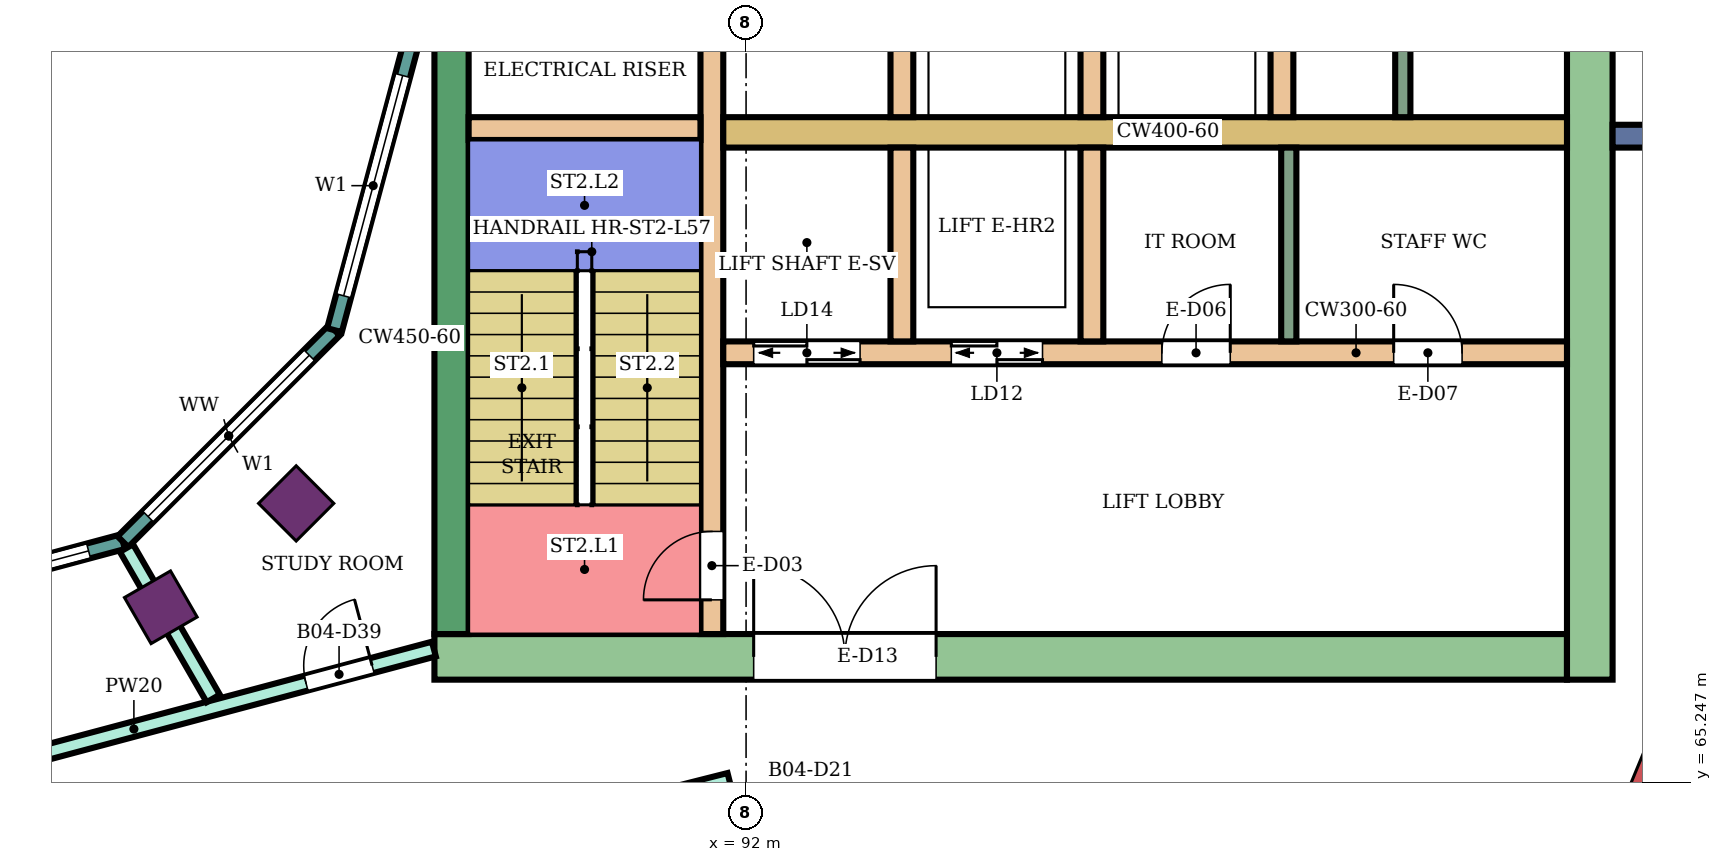
"""IFC4 building model, lengths in metres.
Left out: names, types, materials, properties, quantities, classifications, styles, units other than length and angle.
Written with IfcOpenShell. Run it as: python <this file> out.ifc"""

import sys

from ifc_helpers import new_model, si_unit, direction, frame, frame_2d, origin, origin_2d, place, context, subcontext, project, spatial, rectangle, extrude, element, fill, save


model = new_model("IFC4")
c1 = context("Model", 3, precision=1e-05, world=origin(), true_north=direction((0.0, 1.0)))
c2 = subcontext(c1, "Body", "Model", "MODEL_VIEW")
j1 = project(units=[si_unit("LENGTHUNIT", "METRE"), si_unit("PLANEANGLEUNIT", "RADIAN")], contexts=[c1])
p1 = place(None, origin())
s1 = spatial("IfcSite", under=j1, at=p1, CompositionType="ELEMENT")
p2 = place(p1, origin())
s2 = spatial("IfcBuilding", under=s1, at=p2, CompositionType="ELEMENT")
p3 = place(p2, frame((0.0, 0.0, 249.9)))
s3 = spatial("IfcBuildingStorey", under=s2, at=p3, CompositionType="ELEMENT", Elevation=249.9)
for number, where, z_axis, x_axis in (
    (1, (84.3, 67.552, 0.0), (0.0, 0.0, 1.0), (0.5, -0.866, 0.0)),
    (2, (86.081, 68.919, 0.0), (0.0, 0.0, 1.0), (0.707, -0.707, 0.0)),
):
    element("IfcColumn", number, at=place(p3, frame(where, z_axis=z_axis, x_axis=x_axis)), inside=s3, PredefinedType="COLUMN", context=c2, shape_type="SweptSolid", body=[
        extrude(rectangle(XDim=0.7, YDim=0.7, at=origin_2d()), origin(), (0.0, 0.0, 1.0), 4.2),
    ])
p4 = place(p3, frame((87.9, 66.9, 0.0), z_axis=(0.0, 0.0, 1.0), x_axis=(1.0, 0.0, 0.0)))
e3 = element("IfcWall", 3, at=p4, inside=s3, PredefinedType="SHEAR", context=c2, shape_type="SweptSolid", body=[
    extrude(rectangle(XDim=14.9, YDim=0.6, at=frame_2d((7.45, 0.0))), origin(), (0.0, 0.0, 1.0), 3.88),
])
p5 = place(p4, frame((4.2, 0.0, 0.0)))
e4 = element("IfcOpeningElement", 4, at=p5, cuts=e3, PredefinedType="OPENING", context=c2, shape_type="SweptSolid", body=[
    extrude(rectangle(XDim=2.4, YDim=2.4, at=frame_2d((1.2, 1.2))), frame((0.0, 0.31, 0.0), z_axis=(0.0, -1.0, 0.0), x_axis=(1.0, 0.0, 0.0)), (0.0, 0.0, 1.0), 0.62),
])
p6 = place(p3, frame((88.125, 67.2, 0.0), z_axis=(0.0, 0.0, 1.0), x_axis=(0.0, 1.0, 0.0)))
e5 = element("IfcWall", 5, at=p6, inside=s3, PredefinedType="SHEAR", context=c2, shape_type="SweptSolid", body=[
    extrude(rectangle(XDim=7.8, YDim=0.45, at=frame_2d((3.9, 0.0))), origin(), (0.0, 0.0, 1.0), 3.88),
])
p7 = place(p3, frame((103.1, 66.6, 0.0), z_axis=(0.0, 0.0, 1.0), x_axis=(0.0, 1.0, 0.0)))
e6 = element("IfcWall", 6, at=p7, inside=s3, PredefinedType="SHEAR", context=c2, shape_type="SweptSolid", body=[
    extrude(rectangle(XDim=16.8, YDim=0.6, at=frame_2d((8.4, 0.0))), origin(), (0.0, 0.0, 1.0), 3.88),
])
p8 = place(p3, frame((91.55, 67.2, 0.0), z_axis=(0.0, 0.0, 1.0), x_axis=(0.0, 1.0, 0.0)))
e7 = element("IfcWall", 7, at=p8, inside=s3, PredefinedType="SHEAR", context=c2, shape_type="SweptSolid", body=[
    extrude(rectangle(XDim=7.8, YDim=0.3, at=frame_2d((3.9, 0.0))), origin(), (0.0, 0.0, 1.0), 3.88),
])
p9 = place(p8, frame((0.45, 0.0, 0.0)))
e8 = element("IfcOpeningElement", 8, at=p9, cuts=e7, PredefinedType="OPENING", context=c2, shape_type="SweptSolid", body=[
    extrude(rectangle(XDim=0.9, YDim=2.1, at=frame_2d((0.45, 1.05))), frame((0.0, 0.16, 0.0), z_axis=(0.0, -1.0, 0.0), x_axis=(1.0, 0.0, 0.0)), (0.0, 0.0, 1.0), 0.32),
])
p10 = place(p3, frame((88.35, 73.85, 0.0), z_axis=(0.0, 0.0, 1.0), x_axis=(1.0, 0.0, 0.0)))
e9 = element("IfcWall", 9, at=p10, inside=s3, PredefinedType="SHEAR", context=c2, shape_type="SweptSolid", body=[
    extrude(rectangle(XDim=3.05, YDim=0.3, at=frame_2d((1.525, 0.0))), origin(), (0.0, 0.0, 1.0), 3.88),
])
p11 = place(p3, frame((91.7, 73.8, 0.0), z_axis=(0.0, 0.0, 1.0), x_axis=(1.0, 0.0, 0.0)))
e10 = element("IfcWall", 10, at=p11, inside=s3, PredefinedType="SHEAR", context=c2, shape_type="SweptSolid", body=[
    extrude(rectangle(XDim=11.1, YDim=0.4, at=frame_2d((5.55, 0.0))), origin(), (0.0, 0.0, 1.0), 3.88),
])
p12 = place(p3, frame((91.7, 70.9, 0.0), z_axis=(0.0, 0.0, 1.0), x_axis=(1.0, 0.0, 0.0)))
e11 = element("IfcWall", 11, at=p12, inside=s3, PredefinedType="SHEAR", context=c2, shape_type="SweptSolid", body=[
    extrude(rectangle(XDim=11.1, YDim=0.3, at=frame_2d((5.55, 0.0))), origin(), (0.0, 0.0, 1.0), 3.88),
])
p13 = place(p12, frame((0.4, 0.0, 0.0)))
e12 = element("IfcOpeningElement", 12, at=p13, cuts=e11, PredefinedType="OPENING", context=c2, shape_type="SweptSolid", body=[
    extrude(rectangle(XDim=1.4, YDim=2.1, at=frame_2d((0.7, 1.05))), frame((0.0, 0.16, 0.0), z_axis=(0.0, -1.0, 0.0), x_axis=(1.0, 0.0, 0.0)), (0.0, 0.0, 1.0), 0.32),
])
p14 = place(p12, frame((3.0, 0.0, 0.0)))
e13 = element("IfcOpeningElement", 13, at=p14, cuts=e11, PredefinedType="OPENING", context=c2, shape_type="SweptSolid", body=[
    extrude(rectangle(XDim=1.2, YDim=2.1, at=frame_2d((0.6, 1.05))), frame((0.0, 0.16, 0.0), z_axis=(0.0, -1.0, 0.0), x_axis=(1.0, 0.0, 0.0)), (0.0, 0.0, 1.0), 0.32),
])
p15 = place(p12, frame((5.77, 0.0, 0.0)))
e14 = element("IfcOpeningElement", 14, at=p15, cuts=e11, PredefinedType="OPENING", context=c2, shape_type="SweptSolid", body=[
    extrude(rectangle(XDim=0.9, YDim=2.1, at=frame_2d((0.45, 1.05))), frame((0.0, 0.16, 0.0), z_axis=(0.0, -1.0, 0.0), x_axis=(1.0, 0.0, 0.0)), (0.0, 0.0, 1.0), 0.32),
])
p16 = place(p12, frame((8.82, 0.0, 0.0)))
e15 = element("IfcOpeningElement", 15, at=p16, cuts=e11, PredefinedType="OPENING", context=c2, shape_type="SweptSolid", body=[
    extrude(rectangle(XDim=0.9, YDim=2.1, at=frame_2d((0.45, 1.05))), frame((0.0, 0.16, 0.0), z_axis=(0.0, -1.0, 0.0), x_axis=(1.0, 0.0, 0.0)), (0.0, 0.0, 1.0), 0.32),
])
for number, where, z_axis, x_axis in (
    (16, (94.05, 74.0, 0.0), (0.0, 0.0, 1.0), (0.0, 1.0, 0.0)),
    (17, (96.55, 74.0, 0.0), (0.0, 0.0, 1.0), (0.0, 1.0, 0.0)),
    (18, (99.05, 74.0, 0.0), (0.0, 0.0, 1.0), (0.0, 1.0, 0.0)),
    (19, (94.05, 71.05, 0.0), (0.0, 0.0, 1.0), (0.0, 1.0, 0.0)),
    (20, (96.55, 71.05, 0.0), (0.0, 0.0, 1.0), (0.0, 1.0, 0.0)),
):
    element("IfcWall", number, at=place(p3, frame(where, z_axis=z_axis, x_axis=x_axis)), inside=s3, PredefinedType="SHEAR", context=c2, shape_type="SweptSolid", body=[
        extrude(rectangle(XDim=2.55, YDim=0.3, at=frame_2d((1.275, 0.0))), origin(), (0.0, 0.0, 1.0), 3.88),
    ])
p17 = place(p3, frame((103.4, 73.75, 0.0), z_axis=(0.0, 0.0, 1.0), x_axis=(1.0, 0.0, 0.0)))
e21 = element("IfcWall", 21, at=p17, inside=s3, PredefinedType="NOTDEFINED", context=c2, shape_type="SweptSolid", body=[
    extrude(rectangle(XDim=2.416, YDim=0.3, at=frame_2d((1.208, 0.0))), origin(), (0.0, 0.0, 1.0), 4.2),
])
p18 = place(p3, frame((80.0, 67.396, 0.0), z_axis=(0.0, 0.0, 1.0), x_axis=(0.965933654434, 0.258789828301, 0.0)))
e22 = element("IfcWall", 22, at=p18, inside=s3, PredefinedType="NOTDEFINED", context=c2, shape_type="SweptSolid", body=[
    extrude(rectangle(XDim=3.936, YDim=0.2, at=frame_2d((1.968, 0.0))), origin(), (0.0, 0.0, 1.0), 4.2),
])
p19 = place(p18, frame((0.468, 0.0, 0.9)))
e23 = element("IfcOpeningElement", 23, at=p19, cuts=e22, PredefinedType="OPENING", context=c2, shape_type="SweptSolid", body=[
    extrude(rectangle(XDim=3.0, YDim=2.3, at=frame_2d((1.5, 1.15))), frame((0.0, 0.11, 0.0), z_axis=(0.0, -1.0, 0.0), x_axis=(1.0, 0.0, 0.0)), (0.0, 0.0, 1.0), 0.22),
])
p20 = place(p3, frame((83.802, 68.415, 0.0), z_axis=(0.0, 0.0, 1.0), x_axis=(0.707106781187, 0.707106781187, 0.0)))
e24 = element("IfcWall", 24, at=p20, inside=s3, PredefinedType="NOTDEFINED", context=c2, shape_type="SweptSolid", body=[
    extrude(rectangle(XDim=3.936, YDim=0.2, at=frame_2d((1.968, 0.0))), origin(), (0.0, 0.0, 1.0), 4.2),
])
p21 = place(p20, frame((0.468, 0.0, 0.9)))
e25 = element("IfcOpeningElement", 25, at=p21, cuts=e24, PredefinedType="OPENING", context=c2, shape_type="SweptSolid", body=[
    extrude(rectangle(XDim=3.0, YDim=2.3, at=frame_2d((1.5, 1.15))), frame((0.0, 0.11, 0.0), z_axis=(0.0, -1.0, 0.0), x_axis=(1.0, 0.0, 0.0)), (0.0, 0.0, 1.0), 0.22),
])
p22 = place(p3, frame((86.585, 71.198, 0.0), z_axis=(0.0, 0.0, 1.0), x_axis=(0.258789828301, 0.965933654434, 0.0)))
e26 = element("IfcWall", 26, at=p22, inside=s3, PredefinedType="NOTDEFINED", context=c2, shape_type="SweptSolid", body=[
    extrude(rectangle(XDim=3.936, YDim=0.2, at=frame_2d((1.968, 0.0))), origin(), (0.0, 0.0, 1.0), 4.2),
])
p23 = place(p22, frame((0.468, 0.0, 0.9)))
e27 = element("IfcOpeningElement", 27, at=p23, cuts=e26, PredefinedType="OPENING", context=c2, shape_type="SweptSolid", body=[
    extrude(rectangle(XDim=3.0, YDim=2.3, at=frame_2d((1.5, 1.15))), frame((0.0, 0.11, 0.0), z_axis=(0.0, -1.0, 0.0), x_axis=(1.0, 0.0, 0.0)), (0.0, 0.0, 1.0), 0.22),
])
p24 = place(p3, frame((80.0, 64.898, 0.0), z_axis=(0.0, 0.0, 1.0), x_axis=(0.966237419782, 0.257653349704, 0.0)))
e28 = element("IfcWall", 28, at=p24, inside=s3, PredefinedType="PARTITIONING", context=c2, shape_type="SweptSolid", body=[
    extrude(rectangle(XDim=8.169, YDim=0.2, at=frame_2d((4.084, 0.0))), origin(), (0.0, 0.0, 1.0), 3.75),
])
p25 = place(p24, frame((6.428, 0.0, 0.0)))
e29 = element("IfcOpeningElement", 29, at=p25, cuts=e28, PredefinedType="OPENING", context=c2, shape_type="SweptSolid", body=[
    extrude(rectangle(XDim=0.9, YDim=2.1, at=frame_2d((0.45, 1.05))), frame((0.0, 0.11, 0.0), z_axis=(0.0, -1.0, 0.0), x_axis=(1.0, 0.0, 0.0)), (0.0, 0.0, 1.0), 0.22),
])
p26 = place(p3, frame((83.848, 68.331, 0.0), z_axis=(0.0, 0.0, 1.0), x_axis=(0.499851978358, -0.866110847255, 0.0)))
e30 = element("IfcWall", 30, at=p26, inside=s3, PredefinedType="PARTITIONING", context=c2, shape_type="SweptSolid", body=[
    extrude(rectangle(XDim=2.284, YDim=0.2, at=frame_2d((1.142, 0.0))), origin(), (0.0, 0.0, 1.0), 3.75),
])
p27 = place(p3, frame((86.053, 63.826, 0.0), z_axis=(0.0, 0.0, 1.0), x_axis=(0.969490004987, 0.245130843083, 0.0)))
e31 = element("IfcWall", 31, at=p27, inside=s3, PredefinedType="PARTITIONING", context=c2, shape_type="SweptSolid", body=[
    extrude(rectangle(XDim=5.908, YDim=0.2, at=frame_2d((2.954, 0.0))), origin(), (0.0, 0.0, 1.0), 3.75),
])
for number, where, z_axis, x_axis in (
    (32, (100.64, 74.0, 0.0), (0.0, 0.0, 1.0), (0.0, 1.0, 0.0)),
    (33, (99.14, 71.05, 0.0), (0.0, 0.0, 1.0), (0.0, 1.0, 0.0)),
):
    element("IfcWall", number, at=place(p3, frame(where, z_axis=z_axis, x_axis=x_axis)), inside=s3, PredefinedType="PARTITIONING", context=c2, shape_type="SweptSolid", body=[
        extrude(rectangle(XDim=2.55, YDim=0.2, at=frame_2d((1.275, 0.0))), origin(), (0.0, 0.0, 1.0), 3.88),
    ])
p28 = place(p19, origin())
e34 = element("IfcWindow", 34, at=p28, inside=s3, PartitioningType="SINGLE_PANEL", PredefinedType="WINDOW", context=c2, shape_type="SweptSolid", body=[
    extrude(rectangle(XDim=3.0, YDim=2.3, at=frame_2d((1.5, 1.15))), frame((0.0, 0.03, 0.0), z_axis=(0.0, -1.0, 0.0), x_axis=(1.0, 0.0, 0.0)), (0.0, 0.0, 1.0), 0.06),
])
fill(e23, e34)
p29 = place(p21, origin())
e35 = element("IfcWindow", 35, at=p29, inside=s3, PartitioningType="SINGLE_PANEL", PredefinedType="WINDOW", context=c2, shape_type="SweptSolid", body=[
    extrude(rectangle(XDim=3.0, YDim=2.3, at=frame_2d((1.5, 1.15))), frame((0.0, 0.03, 0.0), z_axis=(0.0, -1.0, 0.0), x_axis=(1.0, 0.0, 0.0)), (0.0, 0.0, 1.0), 0.06),
])
fill(e25, e35)
p30 = place(p23, origin())
e36 = element("IfcWindow", 36, at=p30, inside=s3, PartitioningType="SINGLE_PANEL", PredefinedType="WINDOW", context=c2, shape_type="SweptSolid", body=[
    extrude(rectangle(XDim=3.0, YDim=2.3, at=frame_2d((1.5, 1.15))), frame((0.0, 0.03, 0.0), z_axis=(0.0, -1.0, 0.0), x_axis=(1.0, 0.0, 0.0)), (0.0, 0.0, 1.0), 0.06),
])
fill(e27, e36)
p31 = place(p25, origin())
e37 = element("IfcDoor", 37, at=p31, inside=s3, OperationType="SINGLE_SWING_RIGHT", PredefinedType="DOOR", context=c2, shape_type="SweptSolid", body=[
    extrude(rectangle(XDim=0.9, YDim=2.1, at=frame_2d((0.45, 1.05))), frame((0.0, 0.025, 0.0), z_axis=(0.0, -1.0, 0.0), x_axis=(1.0, 0.0, 0.0)), (0.0, 0.0, 1.0), 0.05),
])
fill(e29, e37)
p32 = place(p9, origin())
e38 = element("IfcDoor", 38, at=p32, inside=s3, OperationType="SINGLE_SWING_LEFT", PredefinedType="DOOR", context=c2, shape_type="SweptSolid", body=[
    extrude(rectangle(XDim=0.9, YDim=2.1, at=frame_2d((0.45, 1.05))), frame((0.0, 0.025, 0.0), z_axis=(0.0, -1.0, 0.0), x_axis=(1.0, 0.0, 0.0)), (0.0, 0.0, 1.0), 0.05),
])
fill(e8, e38)
p33 = place(p13, origin())
e39 = element("IfcDoor", 39, at=p33, inside=s3, OperationType="DOUBLE_DOOR_SLIDING", PredefinedType="DOOR", context=c2, shape_type="SweptSolid", body=[
    extrude(rectangle(XDim=1.4, YDim=2.1, at=frame_2d((0.7, 1.05))), frame((0.0, 0.025, 0.0), z_axis=(0.0, -1.0, 0.0), x_axis=(1.0, 0.0, 0.0)), (0.0, 0.0, 1.0), 0.05),
])
fill(e12, e39)
p34 = place(p14, origin())
e40 = element("IfcDoor", 40, at=p34, inside=s3, OperationType="DOUBLE_DOOR_SLIDING", PredefinedType="DOOR", context=c2, shape_type="SweptSolid", body=[
    extrude(rectangle(XDim=1.2, YDim=2.1, at=frame_2d((0.6, 1.05))), frame((0.0, 0.025, 0.0), z_axis=(0.0, -1.0, 0.0), x_axis=(1.0, 0.0, 0.0)), (0.0, 0.0, 1.0), 0.05),
])
fill(e13, e40)
p35 = place(p15, origin())
e41 = element("IfcDoor", 41, at=p35, inside=s3, OperationType="SINGLE_SWING_RIGHT", PredefinedType="DOOR", context=c2, shape_type="SweptSolid", body=[
    extrude(rectangle(XDim=0.9, YDim=2.1, at=frame_2d((0.45, 1.05))), frame((0.0, 0.025, 0.0), z_axis=(0.0, -1.0, 0.0), x_axis=(1.0, 0.0, 0.0)), (0.0, 0.0, 1.0), 0.05),
])
fill(e14, e41)
p36 = place(p16, origin())
e42 = element("IfcDoor", 42, at=p36, inside=s3, OperationType="SINGLE_SWING_LEFT", PredefinedType="DOOR", context=c2, shape_type="SweptSolid", body=[
    extrude(rectangle(XDim=0.9, YDim=2.1, at=frame_2d((0.45, 1.05))), frame((0.0, 0.025, 0.0), z_axis=(0.0, -1.0, 0.0), x_axis=(1.0, 0.0, 0.0)), (0.0, 0.0, 1.0), 0.05),
])
fill(e15, e42)
p37 = place(p5, origin())
e43 = element("IfcDoor", 43, at=p37, inside=s3, OperationType="DOUBLE_DOOR_SINGLE_SWING", PredefinedType="DOOR", context=c2, shape_type="SweptSolid", body=[
    extrude(rectangle(XDim=2.4, YDim=2.4, at=frame_2d((1.2, 1.2))), frame((0.0, 0.025, 0.0), z_axis=(0.0, -1.0, 0.0), x_axis=(1.0, 0.0, 0.0)), (0.0, 0.0, 1.0), 0.05),
])
fill(e4, e43)
save(model, sys.argv[1])
